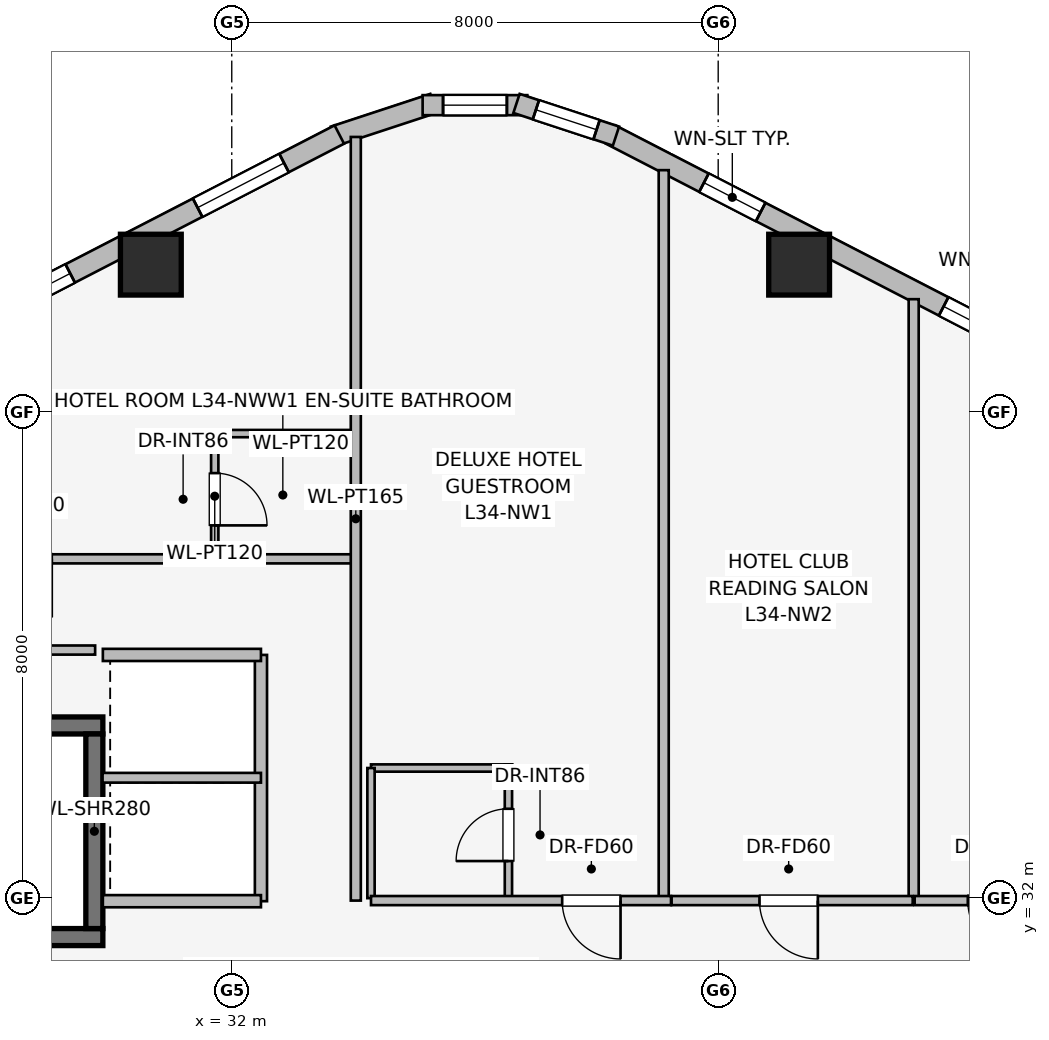
"""IFC4 building model, lengths in metres.
Left out: names, types, materials, properties, quantities, classifications, styles, units other than length and angle.
Written with IfcOpenShell. Run it as: python <this file> out.ifc"""

import sys

from ifc_helpers import new_model, si_unit, direction, frame, frame_2d, origin, origin_2d, place, context, subcontext, project, spatial, rectangle, extrude, element, fill, save


model = new_model("IFC4")
c1 = context("Model", 3, precision=1e-05, world=origin(), true_north=direction((0.0, 1.0)))
c2 = subcontext(c1, "Body", "Model", "MODEL_VIEW")
j1 = project(units=[si_unit("LENGTHUNIT", "METRE"), si_unit("PLANEANGLEUNIT", "RADIAN")], contexts=[c1])
p1 = place(None, origin())
s1 = spatial("IfcSite", under=j1, at=p1, CompositionType="ELEMENT")
p2 = place(p1, origin())
s2 = spatial("IfcBuilding", under=s1, at=p2, CompositionType="ELEMENT")
p3 = place(p2, frame((0.0, 0.0, 129.15)))
s3 = spatial("IfcBuildingStorey", under=s2, at=p3, CompositionType="ELEMENT", Elevation=129.15)
p4 = place(p3, frame((21.52, 31.36, 0.0), z_axis=(0.0, 0.0, 1.0), x_axis=(1.0, 0.0, 0.0)))
e1 = element("IfcWall", 1, at=p4, inside=s3, PredefinedType="SHEAR", context=c2, shape_type="SweptSolid", body=[
    extrude(rectangle(XDim=8.36, YDim=0.28, at=frame_2d((4.18, 0.0))), origin(), (0.0, 0.0, 1.0), 3.45),
])
p5 = place(p4, frame((0.45, 0.0, 0.0)))
e2 = element("IfcOpeningElement", 2, at=p5, cuts=e1, PredefinedType="OPENING", context=c2, shape_type="SweptSolid", body=[
    extrude(rectangle(XDim=1.05, YDim=2.0, at=frame_2d((0.525, 1.0))), frame((0.0, 0.15, 0.0), z_axis=(0.0, -1.0, 0.0), x_axis=(1.0, 0.0, 0.0)), (0.0, 0.0, 1.0), 0.3),
])
p6 = place(p3, frame((29.88, 34.84, 0.0), z_axis=(0.0, 0.0, 1.0), x_axis=(-1.0, 0.0, 0.0)))
e3 = element("IfcWall", 3, at=p6, inside=s3, PredefinedType="SHEAR", context=c2, shape_type="SweptSolid", body=[
    extrude(rectangle(XDim=8.36, YDim=0.28, at=frame_2d((4.18, 0.0))), origin(), (0.0, 0.0, 1.0), 3.45),
])
p7 = place(p3, frame((29.74, 31.5, 0.0), z_axis=(0.0, 0.0, 1.0), x_axis=(0.0, 1.0, 0.0)))
e4 = element("IfcWall", 4, at=p7, inside=s3, PredefinedType="SHEAR", context=c2, shape_type="SweptSolid", body=[
    extrude(rectangle(XDim=3.2, YDim=0.28, at=frame_2d((1.6, 0.0))), origin(), (0.0, 0.0, 1.0), 3.45),
])
for number, where, z_axis, x_axis in (
    (5, (41.331, 42.418, 0.0), (0.0, 0.0, 1.0), (1.0, 0.0, 0.0)),
    (6, (30.669, 42.418, 0.0), (0.0, 0.0, 1.0), (1.0, 0.0, 0.0)),
):
    element("IfcColumn", number, at=place(p3, frame(where, z_axis=z_axis, x_axis=x_axis)), inside=s3, PredefinedType="COLUMN", context=c2, shape_type="SweptSolid", body=[
        extrude(rectangle(XDim=1.0, YDim=1.0, at=origin_2d()), origin(), (0.0, 0.0, 1.0), 3.45),
    ])
p8 = place(p3, frame((38.231, 44.558, 0.0), z_axis=(0.0, 0.0, 1.0), x_axis=(0.888613612362, -0.458656568606, 0.0)))
e7 = element("IfcWall", 7, at=p8, inside=s3, PredefinedType="STANDARD", context=c2, shape_type="SweptSolid", body=[
    extrude(rectangle(XDim=18.681, YDim=0.34, at=frame_2d((9.34, 0.0))), origin(), (0.0, 0.0, 1.0), 3.19),
])
p9 = place(p8, frame((1.727, 0.0, 0.75)))
e8 = element("IfcOpeningElement", 8, at=p9, cuts=e7, PredefinedType="OPENING", context=c2, shape_type="SweptSolid", body=[
    extrude(rectangle(XDim=1.05, YDim=1.4, at=frame_2d((0.525, 0.7))), frame((0.0, 0.18, 0.0), z_axis=(0.0, -1.0, 0.0), x_axis=(1.0, 0.0, 0.0)), (0.0, 0.0, 1.0), 0.36),
])
p10 = place(p8, frame((6.163, 0.0, 0.75)))
e9 = element("IfcOpeningElement", 9, at=p10, cuts=e7, PredefinedType="OPENING", context=c2, shape_type="SweptSolid", body=[
    extrude(rectangle(XDim=2.1, YDim=1.5, at=frame_2d((1.05, 0.75))), frame((0.0, 0.18, 0.0), z_axis=(0.0, -1.0, 0.0), x_axis=(1.0, 0.0, 0.0)), (0.0, 0.0, 1.0), 0.36),
])
p11 = place(p8, frame((9.497, 0.0, 0.75)))
e10 = element("IfcOpeningElement", 10, at=p11, cuts=e7, PredefinedType="OPENING", context=c2, shape_type="SweptSolid", body=[
    extrude(rectangle(XDim=1.6, YDim=1.55, at=frame_2d((0.8, 0.775))), frame((0.0, 0.18, 0.0), z_axis=(0.0, -1.0, 0.0), x_axis=(1.0, 0.0, 0.0)), (0.0, 0.0, 1.0), 0.36),
])
p12 = place(p8, frame((12.728, 0.0, 0.75)))
e11 = element("IfcOpeningElement", 11, at=p12, cuts=e7, PredefinedType="OPENING", context=c2, shape_type="SweptSolid", body=[
    extrude(rectangle(XDim=1.05, YDim=1.4, at=frame_2d((0.525, 0.7))), frame((0.0, 0.18, 0.0), z_axis=(0.0, -1.0, 0.0), x_axis=(1.0, 0.0, 0.0)), (0.0, 0.0, 1.0), 0.36),
])
p13 = place(p8, frame((16.954, 0.0, 0.75)))
e12 = element("IfcOpeningElement", 12, at=p13, cuts=e7, PredefinedType="OPENING", context=c2, shape_type="SweptSolid", body=[
    extrude(rectangle(XDim=1.05, YDim=1.4, at=frame_2d((0.525, 0.7))), frame((0.0, 0.18, 0.0), z_axis=(0.0, -1.0, 0.0), x_axis=(1.0, 0.0, 0.0)), (0.0, 0.0, 1.0), 0.36),
])
p14 = place(p3, frame((33.681, 44.532, 0.0), z_axis=(0.0, 0.0, 1.0), x_axis=(0.949937416267, 0.312440242569, 0.0)))
e13 = element("IfcWall", 13, at=p14, inside=s3, PredefinedType="STANDARD", context=c2, shape_type="SweptSolid", body=[
    extrude(rectangle(XDim=1.722, YDim=0.33, at=frame_2d((0.861, 0.0))), origin(), (0.0, 0.0, 1.0), 3.19),
])
p15 = place(p3, frame((35.139, 45.041, 0.0), z_axis=(0.0, 0.0, 1.0), x_axis=(1.0, 0.0, 0.0)))
e14 = element("IfcWall", 14, at=p15, inside=s3, PredefinedType="STANDARD", context=c2, shape_type="SweptSolid", body=[
    extrude(rectangle(XDim=1.722, YDim=0.33, at=frame_2d((0.861, 0.0))), origin(), (0.0, 0.0, 1.0), 3.19),
])
p16 = place(p15, frame((0.336, 0.0, 0.75)))
e15 = element("IfcOpeningElement", 15, at=p16, cuts=e14, PredefinedType="OPENING", context=c2, shape_type="SweptSolid", body=[
    extrude(rectangle(XDim=1.05, YDim=1.4, at=frame_2d((0.525, 0.7))), frame((0.0, 0.175, 0.0), z_axis=(0.0, -1.0, 0.0), x_axis=(1.0, 0.0, 0.0)), (0.0, 0.0, 1.0), 0.35),
])
p17 = place(p3, frame((36.683, 45.07, 0.0), z_axis=(0.0, 0.0, 1.0), x_axis=(0.949937416267, -0.312440242569, 0.0)))
e16 = element("IfcWall", 16, at=p17, inside=s3, PredefinedType="STANDARD", context=c2, shape_type="SweptSolid", body=[
    extrude(rectangle(XDim=1.722, YDim=0.33, at=frame_2d((0.861, 0.0))), origin(), (0.0, 0.0, 1.0), 3.19),
])
p18 = place(p17, frame((0.336, 0.0, 0.75)))
e17 = element("IfcOpeningElement", 17, at=p18, cuts=e16, PredefinedType="OPENING", context=c2, shape_type="SweptSolid", body=[
    extrude(rectangle(XDim=1.05, YDim=1.4, at=frame_2d((0.525, 0.7))), frame((0.0, 0.175, 0.0), z_axis=(0.0, -1.0, 0.0), x_axis=(1.0, 0.0, 0.0)), (0.0, 0.0, 1.0), 0.35),
])
p19 = place(p3, frame((17.169, 35.99, 0.0), z_axis=(0.0, 0.0, 1.0), x_axis=(0.888613612362, 0.458656568606, 0.0)))
e18 = element("IfcWall", 18, at=p19, inside=s3, PredefinedType="STANDARD", context=c2, shape_type="SweptSolid", body=[
    extrude(rectangle(XDim=18.681, YDim=0.34, at=frame_2d((9.34, 0.0))), origin(), (0.0, 0.0, 1.0), 3.19),
])
p20 = place(p19, frame((1.023, 0.0, 0.75)))
e19 = element("IfcOpeningElement", 19, at=p20, cuts=e18, PredefinedType="OPENING", context=c2, shape_type="SweptSolid", body=[
    extrude(rectangle(XDim=1.6, YDim=1.55, at=frame_2d((0.8, 0.775))), frame((0.0, 0.18, 0.0), z_axis=(0.0, -1.0, 0.0), x_axis=(1.0, 0.0, 0.0)), (0.0, 0.0, 1.0), 0.36),
])
p21 = place(p19, frame((4.981, 0.0, 0.75)))
e20 = element("IfcOpeningElement", 20, at=p21, cuts=e18, PredefinedType="OPENING", context=c2, shape_type="SweptSolid", body=[
    extrude(rectangle(XDim=2.1, YDim=1.5, at=frame_2d((1.05, 0.75))), frame((0.0, 0.18, 0.0), z_axis=(0.0, -1.0, 0.0), x_axis=(1.0, 0.0, 0.0)), (0.0, 0.0, 1.0), 0.36),
])
p22 = place(p19, frame((8.29, 0.0, 0.75)))
e21 = element("IfcOpeningElement", 21, at=p22, cuts=e18, PredefinedType="OPENING", context=c2, shape_type="SweptSolid", body=[
    extrude(rectangle(XDim=2.1, YDim=1.5, at=frame_2d((1.05, 0.75))), frame((0.0, 0.18, 0.0), z_axis=(0.0, -1.0, 0.0), x_axis=(1.0, 0.0, 0.0)), (0.0, 0.0, 1.0), 0.36),
])
p23 = place(p19, frame((11.6, 0.0, 0.75)))
e22 = element("IfcOpeningElement", 22, at=p23, cuts=e18, PredefinedType="OPENING", context=c2, shape_type="SweptSolid", body=[
    extrude(rectangle(XDim=2.1, YDim=1.5, at=frame_2d((1.05, 0.75))), frame((0.0, 0.18, 0.0), z_axis=(0.0, -1.0, 0.0), x_axis=(1.0, 0.0, 0.0)), (0.0, 0.0, 1.0), 0.36),
])
p24 = place(p19, frame((16.058, 0.0, 0.75)))
e23 = element("IfcOpeningElement", 23, at=p24, cuts=e18, PredefinedType="OPENING", context=c2, shape_type="SweptSolid", body=[
    extrude(rectangle(XDim=1.6, YDim=1.55, at=frame_2d((0.8, 0.775))), frame((0.0, 0.18, 0.0), z_axis=(0.0, -1.0, 0.0), x_axis=(1.0, 0.0, 0.0)), (0.0, 0.0, 1.0), 0.36),
])
p25 = place(p3, frame((32.48, 31.95, 0.0), z_axis=(0.0, 0.0, 1.0), x_axis=(0.0, 1.0, 0.0)))
e24 = element("IfcWall", 24, at=p25, inside=s3, PredefinedType="PARTITIONING", context=c2, shape_type="SweptSolid", body=[
    extrude(rectangle(XDim=4.05, YDim=0.2, at=frame_2d((2.025, 0.0))), origin(), (0.0, 0.0, 1.0), 3.19),
])
for number, where, z_axis, x_axis in (
    (25, (29.88, 36.0, 0.0), (0.0, 0.0, 1.0), (1.0, 0.0, 0.0)),
    (26, (32.48, 31.95, 0.0), (0.0, 0.0, 1.0), (-1.0, 0.0, 0.0)),
):
    element("IfcWall", number, at=place(p3, frame(where, z_axis=z_axis, x_axis=x_axis)), inside=s3, PredefinedType="PARTITIONING", context=c2, shape_type="SweptSolid", body=[
        extrude(rectangle(XDim=2.6, YDim=0.2, at=frame_2d((1.3, 0.0))), origin(), (0.0, 0.0, 1.0), 3.19),
    ])
p26 = place(p3, frame((29.875, 33.98, 0.0), z_axis=(0.0, 0.0, 1.0), x_axis=(1.0, 0.0, 0.0)))
e27 = element("IfcWall", 27, at=p26, inside=s3, PredefinedType="PARTITIONING", context=c2, shape_type="SweptSolid", body=[
    extrude(rectangle(XDim=2.605, YDim=0.16, at=frame_2d((1.302, 0.0))), origin(), (0.0, 0.0, 1.0), 3.19),
])
p27 = place(p3, frame((34.0, 39.64, 0.0), z_axis=(0.0, 0.0, 1.0), x_axis=(-1.0, 0.0, 0.0)))
e28 = element("IfcWall", 28, at=p27, inside=s3, PredefinedType="PARTITIONING", context=c2, shape_type="SweptSolid", body=[
    extrude(rectangle(XDim=2.34, YDim=0.12, at=frame_2d((1.17, 0.0))), origin(), (0.0, 0.0, 1.0), 3.19),
])
p28 = place(p3, frame((31.72, 39.64, 0.0), z_axis=(0.0, 0.0, 1.0), x_axis=(0.0, -1.0, 0.0)))
e29 = element("IfcWall", 29, at=p28, inside=s3, PredefinedType="PARTITIONING", context=c2, shape_type="SweptSolid", body=[
    extrude(rectangle(XDim=2.06, YDim=0.12, at=frame_2d((1.03, 0.0))), origin(), (0.0, 0.0, 1.0), 3.19),
])
p29 = place(p28, frame((0.65, 0.0, 0.0)))
e30 = element("IfcOpeningElement", 30, at=p29, cuts=e29, PredefinedType="OPENING", context=c2, shape_type="SweptSolid", body=[
    extrude(rectangle(XDim=0.86, YDim=2.0, at=frame_2d((0.43, 1.0))), frame((0.0, 0.07, 0.0), z_axis=(0.0, -1.0, 0.0), x_axis=(1.0, 0.0, 0.0)), (0.0, 0.0, 1.0), 0.14),
])
p30 = place(p3, frame((34.0, 37.58, 0.0), z_axis=(0.0, 0.0, 1.0), x_axis=(-1.0, 0.0, 0.0)))
e31 = element("IfcWall", 31, at=p30, inside=s3, PredefinedType="PARTITIONING", context=c2, shape_type="SweptSolid", body=[
    extrude(rectangle(XDim=13.707, YDim=0.15, at=frame_2d((6.854, 0.0))), origin(), (0.0, 0.0, 1.0), 2.582),
])
p31 = place(p30, frame((4.96, 0.0, 0.0)))
e32 = element("IfcOpeningElement", 32, at=p31, cuts=e31, PredefinedType="OPENING", context=c2, shape_type="SweptSolid", body=[
    extrude(rectangle(XDim=0.96, YDim=2.0, at=frame_2d((0.48, 1.0))), frame((0.0, 0.085, 0.0), z_axis=(0.0, -1.0, 0.0), x_axis=(1.0, 0.0, 0.0)), (0.0, 0.0, 1.0), 0.17),
])
p32 = place(p3, frame((34.04, 31.96, 0.0), z_axis=(0.0, 0.0, 1.0), x_axis=(0.0, 1.0, 0.0)))
e33 = element("IfcWall", 33, at=p32, inside=s3, PredefinedType="PARTITIONING", context=c2, shape_type="SweptSolid", body=[
    extrude(rectangle(XDim=12.558, YDim=0.165, at=frame_2d((6.279, 0.0))), origin(), (0.0, 0.0, 1.0), 3.19),
])
p33 = place(p3, frame((39.104, 31.97, 0.0), z_axis=(0.0, 0.0, 1.0), x_axis=(0.0, 1.0, 0.0)))
e34 = element("IfcWall", 34, at=p33, inside=s3, PredefinedType="PARTITIONING", context=c2, shape_type="SweptSolid", body=[
    extrude(rectangle(XDim=12.002, YDim=0.165, at=frame_2d((6.001, 0.0))), origin(), (0.0, 0.0, 1.0), 3.19),
])
p34 = place(p3, frame((43.215, 31.97, 0.0), z_axis=(0.0, 0.0, 1.0), x_axis=(0.0, 1.0, 0.0)))
e35 = element("IfcWall", 35, at=p34, inside=s3, PredefinedType="PARTITIONING", context=c2, shape_type="SweptSolid", body=[
    extrude(rectangle(XDim=9.88, YDim=0.165, at=frame_2d((4.94, 0.0))), origin(), (0.0, 0.0, 1.0), 3.19),
])
p35 = place(p3, frame((36.55, 31.96, 0.0), z_axis=(0.0, 0.0, 1.0), x_axis=(0.0, 1.0, 0.0)))
e36 = element("IfcWall", 36, at=p35, inside=s3, PredefinedType="PARTITIONING", context=c2, shape_type="SweptSolid", body=[
    extrude(rectangle(XDim=2.24, YDim=0.12, at=frame_2d((1.12, 0.0))), origin(), (0.0, 0.0, 1.0), 3.19),
])
p36 = place(p35, frame((0.65, 0.0, 0.0)))
e37 = element("IfcOpeningElement", 37, at=p36, cuts=e36, PredefinedType="OPENING", context=c2, shape_type="SweptSolid", body=[
    extrude(rectangle(XDim=0.86, YDim=2.0, at=frame_2d((0.43, 1.0))), frame((0.0, 0.07, 0.0), z_axis=(0.0, -1.0, 0.0), x_axis=(1.0, 0.0, 0.0)), (0.0, 0.0, 1.0), 0.14),
])
p37 = place(p3, frame((36.61, 34.14, 0.0), z_axis=(0.0, 0.0, 1.0), x_axis=(-1.0, 0.0, 0.0)))
e38 = element("IfcWall", 38, at=p37, inside=s3, PredefinedType="PARTITIONING", context=c2, shape_type="SweptSolid", body=[
    extrude(rectangle(XDim=2.32, YDim=0.12, at=frame_2d((1.16, 0.0))), origin(), (0.0, 0.0, 1.0), 3.19),
])
p38 = place(p3, frame((34.29, 34.14, 0.0), z_axis=(0.0, 0.0, 1.0), x_axis=(0.0, -1.0, 0.0)))
e39 = element("IfcWall", 39, at=p38, inside=s3, PredefinedType="PARTITIONING", context=c2, shape_type="SweptSolid", body=[
    extrude(rectangle(XDim=2.14, YDim=0.12, at=frame_2d((1.07, 0.0))), origin(), (0.0, 0.0, 1.0), 3.19),
])
p39 = place(p3, frame((39.224, 31.96, 0.0), z_axis=(0.0, 0.0, 1.0), x_axis=(-1.0, 0.0, 0.0)))
e40 = element("IfcWall", 40, at=p39, inside=s3, PredefinedType="PARTITIONING", context=c2, shape_type="SweptSolid", body=[
    extrude(rectangle(XDim=4.934, YDim=0.15, at=frame_2d((2.467, 0.0))), origin(), (0.0, 0.0, 1.0), 3.19),
])
p40 = place(p39, frame((0.83, 0.0, 0.0)))
e41 = element("IfcOpeningElement", 41, at=p40, cuts=e40, PredefinedType="OPENING", context=c2, shape_type="SweptSolid", body=[
    extrude(rectangle(XDim=0.96, YDim=2.0, at=frame_2d((0.48, 1.0))), frame((0.0, 0.085, 0.0), z_axis=(0.0, -1.0, 0.0), x_axis=(1.0, 0.0, 0.0)), (0.0, 0.0, 1.0), 0.17),
])
p41 = place(p3, frame((43.199, 31.96, 0.0), z_axis=(0.0, 0.0, 1.0), x_axis=(-1.0, 0.0, 0.0)))
e42 = element("IfcWall", 42, at=p41, inside=s3, PredefinedType="PARTITIONING", context=c2, shape_type="SweptSolid", body=[
    extrude(rectangle(XDim=3.965, YDim=0.15, at=frame_2d((1.982, 0.0))), origin(), (0.0, 0.0, 1.0), 3.19),
])
p42 = place(p41, frame((1.56, 0.0, 0.0)))
e43 = element("IfcOpeningElement", 43, at=p42, cuts=e42, PredefinedType="OPENING", context=c2, shape_type="SweptSolid", body=[
    extrude(rectangle(XDim=0.96, YDim=2.0, at=frame_2d((0.48, 1.0))), frame((0.0, 0.085, 0.0), z_axis=(0.0, -1.0, 0.0), x_axis=(1.0, 0.0, 0.0)), (0.0, 0.0, 1.0), 0.17),
])
p43 = place(p3, frame((45.94, 31.96, 0.0), z_axis=(0.0, 0.0, 1.0), x_axis=(-1.0, 0.0, 0.0)))
e44 = element("IfcWall", 44, at=p43, inside=s3, PredefinedType="PARTITIONING", context=c2, shape_type="SweptSolid", body=[
    extrude(rectangle(XDim=2.709, YDim=0.15, at=frame_2d((1.354, 0.0))), origin(), (0.0, 0.0, 1.0), 3.19),
])
p44 = place(p43, frame((0.875, 0.0, 0.0)))
e45 = element("IfcOpeningElement", 45, at=p44, cuts=e44, PredefinedType="OPENING", context=c2, shape_type="SweptSolid", body=[
    extrude(rectangle(XDim=0.96, YDim=2.0, at=frame_2d((0.48, 1.0))), frame((0.0, 0.085, 0.0), z_axis=(0.0, -1.0, 0.0), x_axis=(1.0, 0.0, 0.0)), (0.0, 0.0, 1.0), 0.17),
])
p45 = place(p3, frame((29.753, 36.08, 0.0), z_axis=(0.0, 0.0, 1.0), x_axis=(-1.0, 0.0, 0.0)))
e46 = element("IfcWall", 46, at=p45, inside=s3, PredefinedType="PARTITIONING", context=c2, shape_type="SweptSolid", body=[
    extrude(rectangle(XDim=7.353, YDim=0.15, at=frame_2d((3.677, 0.0))), origin(), (0.0, 0.0, 1.0), 2.582),
])
p46 = place(p9, origin())
e47 = element("IfcWindow", 47, at=p46, inside=s3, PartitioningType="SINGLE_PANEL", PredefinedType="WINDOW", context=c2, shape_type="SweptSolid", body=[
    extrude(rectangle(XDim=1.05, YDim=1.4, at=frame_2d((0.525, 0.7))), frame((0.0, 0.03, 0.0), z_axis=(0.0, -1.0, 0.0), x_axis=(1.0, 0.0, 0.0)), (0.0, 0.0, 1.0), 0.06),
])
fill(e8, e47)
p47 = place(p10, origin())
e48 = element("IfcWindow", 48, at=p47, inside=s3, PartitioningType="SINGLE_PANEL", PredefinedType="WINDOW", context=c2, shape_type="SweptSolid", body=[
    extrude(rectangle(XDim=2.1, YDim=1.5, at=frame_2d((1.05, 0.75))), frame((0.0, 0.03, 0.0), z_axis=(0.0, -1.0, 0.0), x_axis=(1.0, 0.0, 0.0)), (0.0, 0.0, 1.0), 0.06),
])
fill(e9, e48)
p48 = place(p16, origin())
e49 = element("IfcWindow", 49, at=p48, inside=s3, PartitioningType="SINGLE_PANEL", PredefinedType="WINDOW", context=c2, shape_type="SweptSolid", body=[
    extrude(rectangle(XDim=1.05, YDim=1.4, at=frame_2d((0.525, 0.7))), frame((0.0, 0.03, 0.0), z_axis=(0.0, -1.0, 0.0), x_axis=(1.0, 0.0, 0.0)), (0.0, 0.0, 1.0), 0.06),
])
fill(e15, e49)
p49 = place(p18, origin())
e50 = element("IfcWindow", 50, at=p49, inside=s3, PartitioningType="SINGLE_PANEL", PredefinedType="WINDOW", context=c2, shape_type="SweptSolid", body=[
    extrude(rectangle(XDim=1.05, YDim=1.4, at=frame_2d((0.525, 0.7))), frame((0.0, 0.03, 0.0), z_axis=(0.0, -1.0, 0.0), x_axis=(1.0, 0.0, 0.0)), (0.0, 0.0, 1.0), 0.06),
])
fill(e17, e50)
p50 = place(p23, origin())
e51 = element("IfcWindow", 51, at=p50, inside=s3, PartitioningType="SINGLE_PANEL", PredefinedType="WINDOW", context=c2, shape_type="SweptSolid", body=[
    extrude(rectangle(XDim=2.1, YDim=1.5, at=frame_2d((1.05, 0.75))), frame((0.0, 0.03, 0.0), z_axis=(0.0, -1.0, 0.0), x_axis=(1.0, 0.0, 0.0)), (0.0, 0.0, 1.0), 0.06),
])
fill(e22, e51)
p51 = place(p24, origin())
e52 = element("IfcWindow", 52, at=p51, inside=s3, PartitioningType="SINGLE_PANEL", PredefinedType="WINDOW", context=c2, shape_type="SweptSolid", body=[
    extrude(rectangle(XDim=1.6, YDim=1.55, at=frame_2d((0.8, 0.775))), frame((0.0, 0.03, 0.0), z_axis=(0.0, -1.0, 0.0), x_axis=(1.0, 0.0, 0.0)), (0.0, 0.0, 1.0), 0.06),
])
fill(e23, e52)
p52 = place(p29, origin())
e53 = element("IfcDoor", 53, at=p52, inside=s3, OperationType="SINGLE_SWING_RIGHT", PredefinedType="DOOR", context=c2, shape_type="SweptSolid", body=[
    extrude(rectangle(XDim=0.86, YDim=2.0, at=frame_2d((0.43, 1.0))), frame((0.0, 0.025, 0.0), z_axis=(0.0, -1.0, 0.0), x_axis=(1.0, 0.0, 0.0)), (0.0, 0.0, 1.0), 0.05),
])
fill(e30, e53)
p53 = place(p36, origin())
e54 = element("IfcDoor", 54, at=p53, inside=s3, OperationType="SINGLE_SWING_LEFT", PredefinedType="DOOR", context=c2, shape_type="SweptSolid", body=[
    extrude(rectangle(XDim=0.86, YDim=2.0, at=frame_2d((0.43, 1.0))), frame((0.0, 0.025, 0.0), z_axis=(0.0, -1.0, 0.0), x_axis=(1.0, 0.0, 0.0)), (0.0, 0.0, 1.0), 0.05),
])
fill(e37, e54)
p54 = place(p40, origin())
e55 = element("IfcDoor", 55, at=p54, inside=s3, OperationType="SINGLE_SWING_LEFT", PredefinedType="DOOR", context=c2, shape_type="SweptSolid", body=[
    extrude(rectangle(XDim=0.96, YDim=2.0, at=frame_2d((0.48, 1.0))), frame((0.0, 0.025, 0.0), z_axis=(0.0, -1.0, 0.0), x_axis=(1.0, 0.0, 0.0)), (0.0, 0.0, 1.0), 0.05),
])
fill(e41, e55)
p55 = place(p42, origin())
e56 = element("IfcDoor", 56, at=p55, inside=s3, OperationType="SINGLE_SWING_LEFT", PredefinedType="DOOR", context=c2, shape_type="SweptSolid", body=[
    extrude(rectangle(XDim=0.96, YDim=2.0, at=frame_2d((0.48, 1.0))), frame((0.0, 0.025, 0.0), z_axis=(0.0, -1.0, 0.0), x_axis=(1.0, 0.0, 0.0)), (0.0, 0.0, 1.0), 0.05),
])
fill(e43, e56)
p56 = place(p44, origin())
e57 = element("IfcDoor", 57, at=p56, inside=s3, OperationType="SINGLE_SWING_LEFT", PredefinedType="DOOR", context=c2, shape_type="SweptSolid", body=[
    extrude(rectangle(XDim=0.96, YDim=2.0, at=frame_2d((0.48, 1.0))), frame((0.0, 0.025, 0.0), z_axis=(0.0, -1.0, 0.0), x_axis=(1.0, 0.0, 0.0)), (0.0, 0.0, 1.0), 0.05),
])
fill(e45, e57)
save(model, sys.argv[1])
